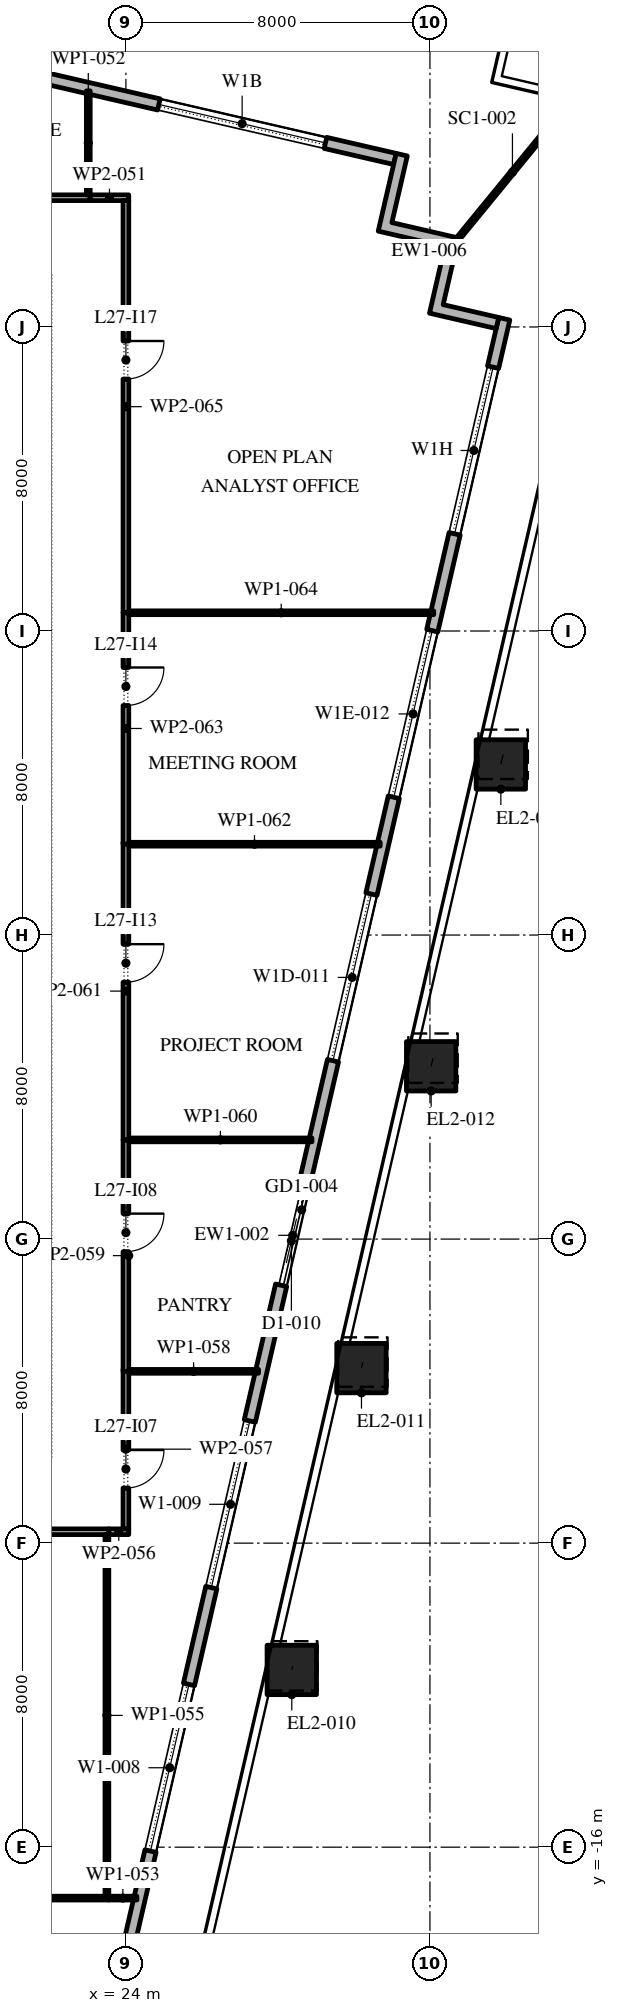
"""IFC4 building model, lengths in metres.
Left out: names, types, materials, properties, quantities, classifications, styles, units other than length and angle.
Written with IfcOpenShell. Run it as: python <this file> out.ifc"""

import sys

from ifc_helpers import new_model, si_unit, direction, frame, frame_2d, origin, origin_2d, place, context, subcontext, project, spatial, polyline, rectangle, outline, extrude, element, fill, save


model = new_model("IFC4")
c1 = context("Model", 3, precision=1e-05, world=origin(), true_north=direction((0.0, 1.0)))
c2 = subcontext(c1, "Body", "Model", "MODEL_VIEW")
j1 = project(units=[si_unit("LENGTHUNIT", "METRE"), si_unit("PLANEANGLEUNIT", "RADIAN")], contexts=[c1])
p1 = place(None, origin())
s1 = spatial("IfcSite", under=j1, at=p1, CompositionType="ELEMENT")
p2 = place(p1, origin())
s2 = spatial("IfcBuilding", under=s1, at=p2, CompositionType="ELEMENT")
p3 = place(p2, frame((0.0, 0.0, 126.6)))
s3 = spatial("IfcBuildingStorey", under=s2, at=p3, CompositionType="ELEMENT", Elevation=126.6)
p4 = place(p3, frame((28.365, -11.336, 0.0), z_axis=(0.005869091843, 0.025277771797, 0.999663237302), x_axis=(-0.974088391429, 0.226167649504, 0.0)))
e1 = element("IfcColumn", 1, at=p4, inside=s3, PredefinedType="COLUMN", context=c2, shape_type="SweptSolid", body=[
    extrude(rectangle(XDim=1.3, YDim=1.3, at=origin_2d()), origin(), (0.0, 0.0, 1.0), 4.201),
])
p5 = place(p3, frame((30.198, -3.395, 0.0), z_axis=(0.008828965511, 0.037929700519, 0.999241405861), x_axis=(-0.97396209058, 0.226710930732, 0.0)))
e2 = element("IfcColumn", 2, at=p5, inside=s3, PredefinedType="COLUMN", context=c2, shape_type="SweptSolid", body=[
    extrude(rectangle(XDim=1.3, YDim=1.3, at=origin_2d()), origin(), (0.0, 0.0, 1.0), 4.203),
])
p6 = place(p3, frame((32.031, 4.547, 0.0), z_axis=(0.01172634467, 0.050504553776, 0.998654986914), x_axis=(-0.974088391429, 0.226167649504, 0.0)))
e3 = element("IfcColumn", 3, at=p6, inside=s3, PredefinedType="COLUMN", context=c2, shape_type="SweptSolid", body=[
    extrude(rectangle(XDim=1.3, YDim=1.3, at=origin_2d()), origin(), (0.0, 0.0, 1.0), 4.206),
])
p7 = place(p3, frame((33.865, 12.489, 0.0), z_axis=(0.014617836866, 0.063111930596, 0.997899395261), x_axis=(-0.974209784844, 0.225644178107, 0.0)))
e4 = element("IfcColumn", 4, at=p7, inside=s3, PredefinedType="COLUMN", context=c2, shape_type="SweptSolid", body=[
    extrude(rectangle(XDim=1.3, YDim=1.3, at=origin_2d()), origin(), (0.0, 0.0, 1.0), 4.209),
])
p8 = place(p3, frame((22.82, -24.016, 0.0), z_axis=(0.0, 0.0, 1.0), x_axis=(0.224953880882, 0.974369412223, 0.0)))
e5 = element("IfcWall", 5, at=p8, inside=s3, PredefinedType="STANDARD", context=c2, shape_type="SweptSolid", body=[
    extrude(rectangle(XDim=49.5, YDim=0.3, at=frame_2d((24.75, 0.0))), origin(), (0.0, 0.0, 1.0), 4.0),
])
p9 = place(p8, frame((1.157, 0.0, 0.45)))
e6 = element("IfcOpeningElement", 6, at=p9, cuts=e5, PredefinedType="OPENING", context=c2, shape_type="SweptSolid", body=[
    extrude(rectangle(XDim=4.5, YDim=3.05, at=frame_2d((2.25, 1.525))), frame((0.0, 0.16, 0.0), z_axis=(0.0, -1.0, 0.0), x_axis=(1.0, 0.0, 0.0)), (0.0, 0.0, 1.0), 0.32),
])
p10 = place(p8, frame((8.121, 0.0, 0.45)))
e7 = element("IfcOpeningElement", 7, at=p10, cuts=e5, PredefinedType="OPENING", context=c2, shape_type="SweptSolid", body=[
    extrude(rectangle(XDim=4.5, YDim=3.05, at=frame_2d((2.25, 1.525))), frame((0.0, 0.16, 0.0), z_axis=(0.0, -1.0, 0.0), x_axis=(1.0, 0.0, 0.0)), (0.0, 0.0, 1.0), 0.32),
])
p11 = place(p8, frame((15.236, 0.0, 0.45)))
e8 = element("IfcOpeningElement", 8, at=p11, cuts=e5, PredefinedType="OPENING", context=c2, shape_type="SweptSolid", body=[
    extrude(rectangle(XDim=4.5, YDim=3.05, at=frame_2d((2.25, 1.525))), frame((0.0, 0.16, 0.0), z_axis=(0.0, -1.0, 0.0), x_axis=(1.0, 0.0, 0.0)), (0.0, 0.0, 1.0), 0.32),
])
p12 = place(p8, frame((23.4, 0.0, 0.0)))
e9 = element("IfcOpeningElement", 9, at=p12, cuts=e5, PredefinedType="OPENING", context=c2, shape_type="SweptSolid", body=[
    extrude(rectangle(XDim=2.4, YDim=3.5, at=frame_2d((1.2, 1.75))), frame((0.0, 0.16, 0.0), z_axis=(0.0, -1.0, 0.0), x_axis=(1.0, 0.0, 0.0)), (0.0, 0.0, 1.0), 0.32),
])
p13 = place(p8, frame((29.464, 0.0, 0.45)))
e10 = element("IfcOpeningElement", 10, at=p13, cuts=e5, PredefinedType="OPENING", context=c2, shape_type="SweptSolid", body=[
    extrude(rectangle(XDim=4.5, YDim=2.875, at=frame_2d((2.25, 1.438))), frame((0.0, 0.16, 0.0), z_axis=(0.0, -1.0, 0.0), x_axis=(1.0, 0.0, 0.0)), (0.0, 0.0, 1.0), 0.32),
])
p14 = place(p8, frame((36.579, 0.0, 0.45)))
e11 = element("IfcOpeningElement", 11, at=p14, cuts=e5, PredefinedType="OPENING", context=c2, shape_type="SweptSolid", body=[
    extrude(rectangle(XDim=4.5, YDim=2.825, at=frame_2d((2.25, 1.413))), frame((0.0, 0.16, 0.0), z_axis=(0.0, -1.0, 0.0), x_axis=(1.0, 0.0, 0.0)), (0.0, 0.0, 1.0), 0.32),
])
p15 = place(p8, frame((43.693, 0.0, 0.45)))
e12 = element("IfcOpeningElement", 12, at=p15, cuts=e5, PredefinedType="OPENING", context=c2, shape_type="SweptSolid", body=[
    extrude(rectangle(XDim=4.5, YDim=2.75, at=frame_2d((2.25, 1.375))), frame((0.0, 0.16, 0.0), z_axis=(0.0, -1.0, 0.0), x_axis=(1.0, 0.0, 0.0)), (0.0, 0.0, 1.0), 0.32),
])
p16 = place(p3, frame((31.078, 28.421, 0.0), z_axis=(0.0, 0.0, 1.0), x_axis=(-0.974370456532, 0.224949357493, 0.0)))
e13 = element("IfcWall", 13, at=p16, inside=s3, PredefinedType="STANDARD", context=c2, shape_type="SweptSolid", body=[
    extrude(rectangle(XDim=51.0, YDim=0.3, at=frame_2d((25.5, 0.0))), origin(), (0.0, 0.0, 1.0), 4.0),
])
p17 = place(p16, frame((1.875, 0.0, 0.45)))
e14 = element("IfcOpeningElement", 14, at=p17, cuts=e13, PredefinedType="OPENING", context=c2, shape_type="SweptSolid", body=[
    extrude(rectangle(XDim=4.5, YDim=2.95, at=frame_2d((2.25, 1.475))), frame((0.0, 0.16, 0.0), z_axis=(0.0, -1.0, 0.0), x_axis=(1.0, 0.0, 0.0)), (0.0, 0.0, 1.0), 0.32),
])
p18 = place(p16, frame((10.275, 0.0, 0.45)))
e15 = element("IfcOpeningElement", 15, at=p18, cuts=e13, PredefinedType="OPENING", context=c2, shape_type="SweptSolid", body=[
    extrude(rectangle(XDim=4.5, YDim=2.875, at=frame_2d((2.25, 1.438))), frame((0.0, 0.16, 0.0), z_axis=(0.0, -1.0, 0.0), x_axis=(1.0, 0.0, 0.0)), (0.0, 0.0, 1.0), 0.32),
])
p19 = place(p16, frame((18.825, 0.0, 0.45)))
e16 = element("IfcOpeningElement", 16, at=p19, cuts=e13, PredefinedType="OPENING", context=c2, shape_type="SweptSolid", body=[
    extrude(rectangle(XDim=4.5, YDim=2.825, at=frame_2d((2.25, 1.413))), frame((0.0, 0.16, 0.0), z_axis=(0.0, -1.0, 0.0), x_axis=(1.0, 0.0, 0.0)), (0.0, 0.0, 1.0), 0.32),
])
p20 = place(p16, frame((27.075, 0.0, 0.0)))
e17 = element("IfcOpeningElement", 17, at=p20, cuts=e13, PredefinedType="OPENING", context=c2, shape_type="SweptSolid", body=[
    extrude(rectangle(XDim=2.4, YDim=3.125, at=frame_2d((1.2, 1.562))), frame((0.0, 0.16, 0.0), z_axis=(0.0, -1.0, 0.0), x_axis=(1.0, 0.0, 0.0)), (0.0, 0.0, 1.0), 0.32),
])
p21 = place(p16, frame((35.925, 0.0, 0.45)))
e18 = element("IfcOpeningElement", 18, at=p21, cuts=e13, PredefinedType="OPENING", context=c2, shape_type="SweptSolid", body=[
    extrude(rectangle(XDim=4.5, YDim=2.575, at=frame_2d((2.25, 1.288))), frame((0.0, 0.16, 0.0), z_axis=(0.0, -1.0, 0.0), x_axis=(1.0, 0.0, 0.0)), (0.0, 0.0, 1.0), 0.32),
])
p22 = place(p16, frame((44.475, 0.0, 0.45)))
e19 = element("IfcOpeningElement", 19, at=p22, cuts=e13, PredefinedType="OPENING", context=c2, shape_type="SweptSolid", body=[
    extrude(rectangle(XDim=4.5, YDim=3.05, at=frame_2d((2.25, 1.525))), frame((0.0, 0.16, 0.0), z_axis=(0.0, -1.0, 0.0), x_axis=(1.0, 0.0, 0.0)), (0.0, 0.0, 1.0), 0.32),
])
p23 = place(p3, origin())
e20 = element("IfcWall", 20, at=p23, inside=s3, PredefinedType="STANDARD", context=c2, shape_type="SweptSolid", body=[
    extrude(outline(polyline([(32.393, 26.116), (30.639, 26.521), (31.111, 28.567), (31.404, 28.5), (30.999, 26.746), (32.753, 26.341), (32.348, 24.587), (33.809, 24.25), (33.742, 23.957), (31.988, 24.362), (32.393, 26.116)])), origin(), (0.0, 0.0, 1.0), 4.0),
])
p24 = place(p3, frame((32.753, 26.341, -0.05), z_axis=(0.0, 0.0, 1.0), x_axis=(0.63347537835, 0.773762848051, 0.0)))
e21 = element("IfcWall", 21, at=p24, inside=s3, PredefinedType="STANDARD", context=c2, shape_type="SweptSolid", body=[
    extrude(rectangle(XDim=4.476, YDim=0.1, at=frame_2d((2.238, 0.0))), origin(), (0.0, 0.0, 1.0), 4.05),
])
p25 = place(p3, frame((13.45, -17.34, 0.0), z_axis=(0.0, 0.0, 1.0), x_axis=(1.0, 0.0, 0.0)))
e22 = element("IfcWall", 22, at=p25, inside=s3, PredefinedType="PARTITIONING", context=c2, shape_type="SweptSolid", body=[
    extrude(rectangle(XDim=10.1, YDim=0.1, at=frame_2d((5.05, 0.0))), origin(), (0.0, 0.0, 1.0), 4.0),
])
p26 = place(p25, frame((4.5, 0.0, 0.0)))
e23 = element("IfcOpeningElement", 23, at=p26, cuts=e22, PredefinedType="OPENING", context=c2, shape_type="SweptSolid", body=[
    extrude(rectangle(XDim=0.9, YDim=2.1, at=frame_2d((0.45, 1.05))), frame((0.0, 0.06, 0.0), z_axis=(0.0, -1.0, 0.0), x_axis=(1.0, 0.0, 0.0)), (0.0, 0.0, 1.0), 0.12),
])
p27 = place(p3, frame((14.62, 27.4, 0.0), z_axis=(0.0, 0.0, 1.0), x_axis=(1.0, 0.0, 0.0)))
e24 = element("IfcWall", 24, at=p27, inside=s3, PredefinedType="PARTITIONING", context=c2, shape_type="SweptSolid", body=[
    extrude(rectangle(XDim=8.44, YDim=0.15, at=frame_2d((4.22, 0.0))), origin(), (0.0, 0.0, 1.0), 4.0),
])
p28 = place(p27, frame((2.99, 0.0, 0.0)))
e25 = element("IfcOpeningElement", 25, at=p28, cuts=e24, PredefinedType="OPENING", context=c2, shape_type="SweptSolid", body=[
    extrude(rectangle(XDim=1.0, YDim=2.1, at=frame_2d((0.5, 1.05))), frame((0.0, 0.085, 0.0), z_axis=(0.0, -1.0, 0.0), x_axis=(1.0, 0.0, 0.0)), (0.0, 0.0, 1.0), 0.17),
])
p29 = place(p3, frame((23.06, 27.4, 0.0), z_axis=(0.0, 0.0, 1.0), x_axis=(1.0, 0.0, 0.0)))
e26 = element("IfcWall", 26, at=p29, inside=s3, PredefinedType="PARTITIONING", context=c2, shape_type="SweptSolid", body=[
    extrude(rectangle(XDim=1.015, YDim=0.15, at=frame_2d((0.507, 0.0))), origin(), (0.0, 0.0, 1.0), 4.0),
])
p30 = place(p3, frame((23.01, 30.212, 0.0), z_axis=(0.0, 0.0, 1.0), x_axis=(0.0, -1.0, 0.0)))
e27 = element("IfcWall", 27, at=p30, inside=s3, PredefinedType="PARTITIONING", context=c2, shape_type="SweptSolid", body=[
    extrude(rectangle(XDim=2.737, YDim=0.1, at=frame_2d((1.368, 0.0))), origin(), (0.0, 0.0, 1.0), 4.0),
])
p31 = place(p3, frame((23.55, -17.34, 0.0), z_axis=(0.0, 0.0, 1.0), x_axis=(1.0, 0.0, 0.0)))
e28 = element("IfcWall", 28, at=p31, inside=s3, PredefinedType="PARTITIONING", context=c2, shape_type="SweptSolid", body=[
    extrude(rectangle(XDim=0.74, YDim=0.1, at=frame_2d((0.37, 0.0))), origin(), (0.0, 0.0, 1.0), 4.0),
])
p32 = place(p3, frame((23.55, -7.7, 0.0), z_axis=(0.0, 0.0, 1.0), x_axis=(-1.0, 0.0, 0.0)))
e29 = element("IfcWall", 29, at=p32, inside=s3, PredefinedType="PARTITIONING", context=c2, shape_type="SweptSolid", body=[
    extrude(rectangle(XDim=10.05, YDim=0.15, at=frame_2d((5.025, 0.0))), origin(), (0.0, 0.0, 1.0), 4.0),
])
p33 = place(p32, frame((2.65, 0.0, 0.0)))
e30 = element("IfcOpeningElement", 30, at=p33, cuts=e29, PredefinedType="OPENING", context=c2, shape_type="SweptSolid", body=[
    extrude(rectangle(XDim=1.0, YDim=2.1, at=frame_2d((0.5, 1.05))), frame((0.0, 0.085, 0.0), z_axis=(0.0, -1.0, 0.0), x_axis=(1.0, 0.0, 0.0)), (0.0, 0.0, 1.0), 0.17),
])
p34 = place(p3, frame((23.5, -7.775, 0.0), z_axis=(0.0, 0.0, 1.0), x_axis=(0.0, -1.0, 0.0)))
e31 = element("IfcWall", 31, at=p34, inside=s3, PredefinedType="PARTITIONING", context=c2, shape_type="SweptSolid", body=[
    extrude(rectangle(XDim=9.515, YDim=0.1, at=frame_2d((4.758, 0.0))), origin(), (0.0, 0.0, 1.0), 4.0),
])
p35 = place(p3, frame((24.075, -7.7, 0.0), z_axis=(0.0, 0.0, 1.0), x_axis=(-1.0, 0.0, 0.0)))
e32 = element("IfcWall", 32, at=p35, inside=s3, PredefinedType="PARTITIONING", context=c2, shape_type="SweptSolid", body=[
    extrude(rectangle(XDim=0.525, YDim=0.15, at=frame_2d((0.262, 0.0))), origin(), (0.0, 0.0, 1.0), 4.0),
])
p36 = place(p3, frame((24.0, -3.43, 0.0), z_axis=(0.0, 0.0, 1.0), x_axis=(0.0, -1.0, 0.0)))
e33 = element("IfcWall", 33, at=p36, inside=s3, PredefinedType="PARTITIONING", context=c2, shape_type="SweptSolid", body=[
    extrude(rectangle(XDim=4.195, YDim=0.15, at=frame_2d((2.098, 0.0))), origin(), (0.0, 0.0, 1.0), 4.0),
])
p37 = place(p36, frame((2.12, 0.0, 0.0)))
e34 = element("IfcOpeningElement", 34, at=p37, cuts=e33, PredefinedType="OPENING", context=c2, shape_type="SweptSolid", body=[
    extrude(rectangle(XDim=1.0, YDim=2.1, at=frame_2d((0.5, 1.05))), frame((0.0, 0.085, 0.0), z_axis=(0.0, -1.0, 0.0), x_axis=(1.0, 0.0, 0.0)), (0.0, 0.0, 1.0), 0.17),
])
p38 = place(p3, frame((24.075, -3.48, 0.0), z_axis=(0.0, 0.0, 1.0), x_axis=(1.0, 0.0, 0.0)))
e35 = element("IfcWall", 35, at=p38, inside=s3, PredefinedType="PARTITIONING", context=c2, shape_type="SweptSolid", body=[
    extrude(rectangle(XDim=3.415, YDim=0.1, at=frame_2d((1.708, 0.0))), origin(), (0.0, 0.0, 1.0), 4.0),
])
p39 = place(p3, frame((24.0, 2.61, 0.0), z_axis=(0.0, 0.0, 1.0), x_axis=(0.0, -1.0, 0.0)))
e36 = element("IfcWall", 36, at=p39, inside=s3, PredefinedType="PARTITIONING", context=c2, shape_type="SweptSolid", body=[
    extrude(rectangle(XDim=6.09, YDim=0.15, at=frame_2d((3.045, 0.0))), origin(), (0.0, 0.0, 1.0), 4.0),
])
p40 = place(p39, frame((1.94, 0.0, 0.0)))
e37 = element("IfcOpeningElement", 37, at=p40, cuts=e36, PredefinedType="OPENING", context=c2, shape_type="SweptSolid", body=[
    extrude(rectangle(XDim=1.0, YDim=2.1, at=frame_2d((0.5, 1.05))), frame((0.0, 0.085, 0.0), z_axis=(0.0, -1.0, 0.0), x_axis=(1.0, 0.0, 0.0)), (0.0, 0.0, 1.0), 0.17),
])
p41 = place(p3, frame((24.075, 2.61, 0.0), z_axis=(0.0, 0.0, 1.0), x_axis=(1.0, 0.0, 0.0)))
e38 = element("IfcWall", 38, at=p41, inside=s3, PredefinedType="PARTITIONING", context=c2, shape_type="SweptSolid", body=[
    extrude(rectangle(XDim=4.821, YDim=0.1, at=frame_2d((2.411, 0.0))), origin(), (0.0, 0.0, 1.0), 4.0),
])
p42 = place(p3, frame((24.0, 10.44, 0.0), z_axis=(0.0, 0.0, 1.0), x_axis=(0.0, -1.0, 0.0)))
e39 = element("IfcWall", 39, at=p42, inside=s3, PredefinedType="PARTITIONING", context=c2, shape_type="SweptSolid", body=[
    extrude(rectangle(XDim=7.83, YDim=0.15, at=frame_2d((3.915, 0.0))), origin(), (0.0, 0.0, 1.0), 4.0),
])
p43 = place(p42, frame((2.68, 0.0, 0.0)))
e40 = element("IfcOpeningElement", 40, at=p43, cuts=e39, PredefinedType="OPENING", context=c2, shape_type="SweptSolid", body=[
    extrude(rectangle(XDim=1.0, YDim=2.1, at=frame_2d((0.5, 1.05))), frame((0.0, 0.085, 0.0), z_axis=(0.0, -1.0, 0.0), x_axis=(1.0, 0.0, 0.0)), (0.0, 0.0, 1.0), 0.17),
])
p44 = place(p3, frame((24.075, 10.39, 0.0), z_axis=(0.0, 0.0, 1.0), x_axis=(1.0, 0.0, 0.0)))
e41 = element("IfcWall", 41, at=p44, inside=s3, PredefinedType="PARTITIONING", context=c2, shape_type="SweptSolid", body=[
    extrude(rectangle(XDim=6.617, YDim=0.1, at=frame_2d((3.309, 0.0))), origin(), (0.0, 0.0, 1.0), 4.0),
])
p45 = place(p3, frame((24.0, 16.48, 0.0), z_axis=(0.0, 0.0, 1.0), x_axis=(0.0, -1.0, 0.0)))
e42 = element("IfcWall", 42, at=p45, inside=s3, PredefinedType="PARTITIONING", context=c2, shape_type="SweptSolid", body=[
    extrude(rectangle(XDim=6.09, YDim=0.15, at=frame_2d((3.045, 0.0))), origin(), (0.0, 0.0, 1.0), 4.0),
])
p46 = place(p45, frame((1.44, 0.0, 0.0)))
e43 = element("IfcOpeningElement", 43, at=p46, cuts=e42, PredefinedType="OPENING", context=c2, shape_type="SweptSolid", body=[
    extrude(rectangle(XDim=1.0, YDim=2.1, at=frame_2d((0.5, 1.05))), frame((0.0, 0.085, 0.0), z_axis=(0.0, -1.0, 0.0), x_axis=(1.0, 0.0, 0.0)), (0.0, 0.0, 1.0), 0.17),
])
p47 = place(p3, frame((24.075, 16.48, 0.0), z_axis=(0.0, 0.0, 1.0), x_axis=(1.0, 0.0, 0.0)))
e44 = element("IfcWall", 44, at=p47, inside=s3, PredefinedType="PARTITIONING", context=c2, shape_type="SweptSolid", body=[
    extrude(rectangle(XDim=8.023, YDim=0.1, at=frame_2d((4.011, 0.0))), origin(), (0.0, 0.0, 1.0), 4.0),
])
p48 = place(p3, frame((24.0, 27.325, 0.0), z_axis=(0.0, 0.0, 1.0), x_axis=(0.0, -1.0, 0.0)))
e45 = element("IfcWall", 45, at=p48, inside=s3, PredefinedType="PARTITIONING", context=c2, shape_type="SweptSolid", body=[
    extrude(rectangle(XDim=10.845, YDim=0.15, at=frame_2d((5.422, 0.0))), origin(), (0.0, 0.0, 1.0), 4.0),
])
p49 = place(p48, frame((3.695, 0.0, 0.0)))
e46 = element("IfcOpeningElement", 46, at=p49, cuts=e45, PredefinedType="OPENING", context=c2, shape_type="SweptSolid", body=[
    extrude(rectangle(XDim=1.0, YDim=2.1, at=frame_2d((0.5, 1.05))), frame((0.0, 0.085, 0.0), z_axis=(0.0, -1.0, 0.0), x_axis=(1.0, 0.0, 0.0)), (0.0, 0.0, 1.0), 0.17),
])
p50 = place(p10, origin())
e47 = element("IfcWindow", 47, at=p50, inside=s3, PartitioningType="DOUBLE_PANEL_VERTICAL", PredefinedType="WINDOW", context=c2, shape_type="SweptSolid", body=[
    extrude(rectangle(XDim=4.5, YDim=3.05, at=frame_2d((2.25, 1.525))), frame((0.0, 0.03, 0.0), z_axis=(0.0, -1.0, 0.0), x_axis=(1.0, 0.0, 0.0)), (0.0, 0.0, 1.0), 0.06),
])
fill(e7, e47)
p51 = place(p11, origin())
e48 = element("IfcWindow", 48, at=p51, inside=s3, PartitioningType="DOUBLE_PANEL_VERTICAL", PredefinedType="WINDOW", context=c2, shape_type="SweptSolid", body=[
    extrude(rectangle(XDim=4.5, YDim=3.05, at=frame_2d((2.25, 1.525))), frame((0.0, 0.03, 0.0), z_axis=(0.0, -1.0, 0.0), x_axis=(1.0, 0.0, 0.0)), (0.0, 0.0, 1.0), 0.06),
])
fill(e8, e48)
p52 = place(p12, origin())
e49 = element("IfcDoor", 49, at=p52, inside=s3, OperationType="DOUBLE_DOOR_SLIDING", PredefinedType="DOOR", context=c2, shape_type="SweptSolid", body=[
    extrude(rectangle(XDim=2.4, YDim=3.5, at=frame_2d((1.2, 1.75))), frame((0.0, 0.025, 0.0), z_axis=(0.0, -1.0, 0.0), x_axis=(1.0, 0.0, 0.0)), (0.0, 0.0, 1.0), 0.05),
])
fill(e9, e49)
p53 = place(p13, origin())
e50 = element("IfcWindow", 50, at=p53, inside=s3, PartitioningType="DOUBLE_PANEL_VERTICAL", PredefinedType="WINDOW", context=c2, shape_type="SweptSolid", body=[
    extrude(rectangle(XDim=4.5, YDim=2.875, at=frame_2d((2.25, 1.438))), frame((0.0, 0.03, 0.0), z_axis=(0.0, -1.0, 0.0), x_axis=(1.0, 0.0, 0.0)), (0.0, 0.0, 1.0), 0.06),
])
fill(e10, e50)
p54 = place(p14, origin())
e51 = element("IfcWindow", 51, at=p54, inside=s3, PartitioningType="DOUBLE_PANEL_VERTICAL", PredefinedType="WINDOW", context=c2, shape_type="SweptSolid", body=[
    extrude(rectangle(XDim=4.5, YDim=2.825, at=frame_2d((2.25, 1.413))), frame((0.0, 0.03, 0.0), z_axis=(0.0, -1.0, 0.0), x_axis=(1.0, 0.0, 0.0)), (0.0, 0.0, 1.0), 0.06),
])
fill(e11, e51)
p55 = place(p15, origin())
e52 = element("IfcWindow", 52, at=p55, inside=s3, PartitioningType="DOUBLE_PANEL_VERTICAL", PredefinedType="WINDOW", context=c2, shape_type="SweptSolid", body=[
    extrude(rectangle(XDim=4.5, YDim=2.75, at=frame_2d((2.25, 1.375))), frame((0.0, 0.03, 0.0), z_axis=(0.0, -1.0, 0.0), x_axis=(1.0, 0.0, 0.0)), (0.0, 0.0, 1.0), 0.06),
])
fill(e12, e52)
p56 = place(p17, origin())
e53 = element("IfcWindow", 53, at=p56, inside=s3, PartitioningType="DOUBLE_PANEL_VERTICAL", PredefinedType="WINDOW", context=c2, shape_type="SweptSolid", body=[
    extrude(rectangle(XDim=4.5, YDim=2.95, at=frame_2d((2.25, 1.475))), frame((0.0, 0.03, 0.0), z_axis=(0.0, -1.0, 0.0), x_axis=(1.0, 0.0, 0.0)), (0.0, 0.0, 1.0), 0.06),
])
fill(e14, e53)
p57 = place(p37, origin())
e54 = element("IfcDoor", 54, at=p57, inside=s3, OperationType="SINGLE_SWING_RIGHT", PredefinedType="DOOR", context=c2, shape_type="SweptSolid", body=[
    extrude(rectangle(XDim=1.0, YDim=2.1, at=frame_2d((0.5, 1.05))), frame((0.0, 0.025, 0.0), z_axis=(0.0, -1.0, 0.0), x_axis=(1.0, 0.0, 0.0)), (0.0, 0.0, 1.0), 0.05),
])
fill(e34, e54)
p58 = place(p40, origin())
e55 = element("IfcDoor", 55, at=p58, inside=s3, OperationType="SINGLE_SWING_RIGHT", PredefinedType="DOOR", context=c2, shape_type="SweptSolid", body=[
    extrude(rectangle(XDim=1.0, YDim=2.1, at=frame_2d((0.5, 1.05))), frame((0.0, 0.025, 0.0), z_axis=(0.0, -1.0, 0.0), x_axis=(1.0, 0.0, 0.0)), (0.0, 0.0, 1.0), 0.05),
])
fill(e37, e55)
p59 = place(p43, origin())
e56 = element("IfcDoor", 56, at=p59, inside=s3, OperationType="SINGLE_SWING_RIGHT", PredefinedType="DOOR", context=c2, shape_type="SweptSolid", body=[
    extrude(rectangle(XDim=1.0, YDim=2.1, at=frame_2d((0.5, 1.05))), frame((0.0, 0.025, 0.0), z_axis=(0.0, -1.0, 0.0), x_axis=(1.0, 0.0, 0.0)), (0.0, 0.0, 1.0), 0.05),
])
fill(e40, e56)
p60 = place(p46, origin())
e57 = element("IfcDoor", 57, at=p60, inside=s3, OperationType="SINGLE_SWING_RIGHT", PredefinedType="DOOR", context=c2, shape_type="SweptSolid", body=[
    extrude(rectangle(XDim=1.0, YDim=2.1, at=frame_2d((0.5, 1.05))), frame((0.0, 0.025, 0.0), z_axis=(0.0, -1.0, 0.0), x_axis=(1.0, 0.0, 0.0)), (0.0, 0.0, 1.0), 0.05),
])
fill(e43, e57)
p61 = place(p49, origin())
e58 = element("IfcDoor", 58, at=p61, inside=s3, OperationType="SINGLE_SWING_RIGHT", PredefinedType="DOOR", context=c2, shape_type="SweptSolid", body=[
    extrude(rectangle(XDim=1.0, YDim=2.1, at=frame_2d((0.5, 1.05))), frame((0.0, 0.025, 0.0), z_axis=(0.0, -1.0, 0.0), x_axis=(1.0, 0.0, 0.0)), (0.0, 0.0, 1.0), 0.05),
])
fill(e46, e58)
save(model, sys.argv[1])
